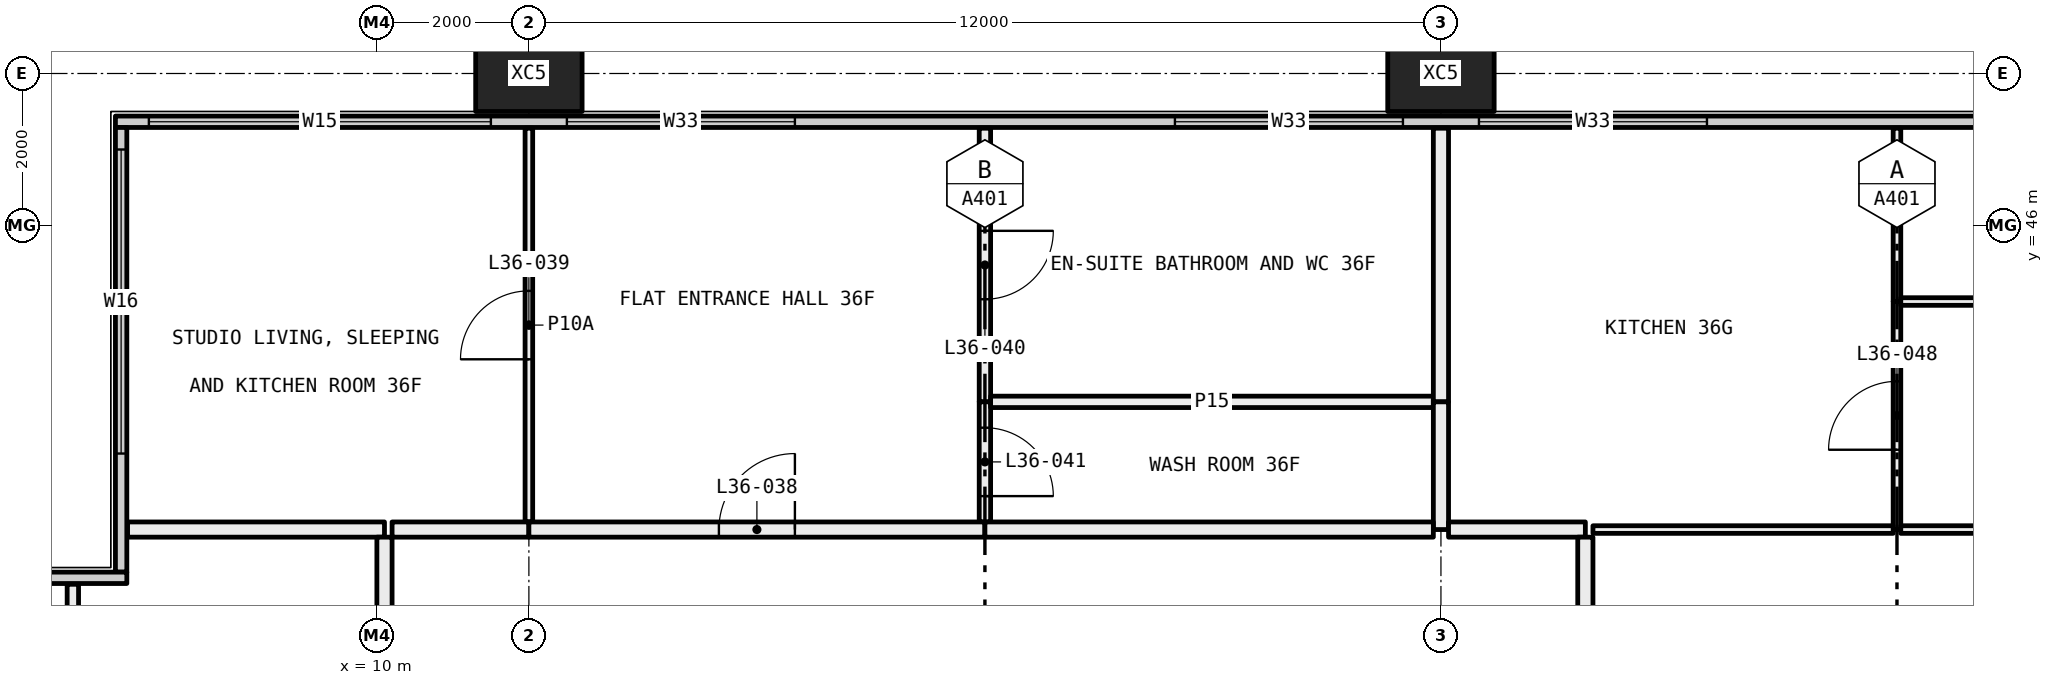
"""IFC4 building model, lengths in metres.
Left out: names, types, materials, properties, quantities, classifications, styles, units other than length and angle.
Written with IfcOpenShell. Run it as: python <this file> out.ifc"""

import sys

from ifc_helpers import new_model, si_unit, direction, frame, frame_2d, origin, origin_2d, place, context, subcontext, project, spatial, rectangle, hollow_rectangle, extrude, element, fill, save


model = new_model("IFC4")
c1 = context("Model", 3, precision=1e-05, world=origin(), true_north=direction((0.0, 1.0)))
c2 = subcontext(c1, "Body", "Model", "MODEL_VIEW")
j1 = project(units=[si_unit("LENGTHUNIT", "METRE"), si_unit("PLANEANGLEUNIT", "RADIAN")], contexts=[c1])
p1 = place(None, origin())
s1 = spatial("IfcSite", under=j1, at=p1, CompositionType="ELEMENT")
p2 = place(p1, origin())
s2 = spatial("IfcBuilding", under=s1, at=p2, CompositionType="ELEMENT")
p3 = place(p2, frame((0.0, 0.0, 138.0)))
s3 = spatial("IfcBuildingStorey", under=s2, at=p3, CompositionType="ELEMENT", Elevation=138.0)
for number, where, z_axis, x_axis in (
    (1, (12.0, 48.0, -0.4), (0.0, 0.0, 1.0), (1.0, 0.0, 0.0)),
    (2, (24.0, 48.0, -0.4), (0.0, 0.0, 1.0), (1.0, 0.0, 0.0)),
):
    element("IfcColumn", number, at=place(p3, frame(where, z_axis=z_axis, x_axis=x_axis)), inside=s3, PredefinedType="COLUMN", context=c2, shape_type="SweptSolid", body=[
        extrude(hollow_rectangle(XDim=1.4, YDim=1.0, WallThickness=0.055, at=origin_2d()), origin(), (0.0, 0.0, 1.0), 3.45),
    ])
p4 = place(p3, frame((6.56, 47.365, 0.0), z_axis=(0.0, 0.0, 1.0), x_axis=(1.0, 0.0, 0.0)))
e3 = element("IfcWall", 3, at=p4, inside=s3, PredefinedType="ELEMENTEDWALL", context=c2, shape_type="SweptSolid", body=[
    extrude(rectangle(XDim=58.88, YDim=0.15, at=frame_2d((29.44, 0.0))), origin(), (0.0, 0.0, 1.0), 3.05),
])
p5 = place(p4, frame((0.44, 0.0, 0.45)))
e4 = element("IfcOpeningElement", 4, at=p5, cuts=e3, PredefinedType="OPENING", context=c2, shape_type="SweptSolid", body=[
    extrude(rectangle(XDim=4.5, YDim=2.55, at=frame_2d((2.25, 1.275))), frame((0.0, 0.085, 0.0), z_axis=(0.0, -1.0, 0.0), x_axis=(1.0, 0.0, 0.0)), (0.0, 0.0, 1.0), 0.17),
])
p6 = place(p4, frame((5.94, 0.0, 0.45)))
e5 = element("IfcOpeningElement", 5, at=p6, cuts=e3, PredefinedType="OPENING", context=c2, shape_type="SweptSolid", body=[
    extrude(rectangle(XDim=3.0, YDim=2.55, at=frame_2d((1.5, 1.275))), frame((0.0, 0.085, 0.0), z_axis=(0.0, -1.0, 0.0), x_axis=(1.0, 0.0, 0.0)), (0.0, 0.0, 1.0), 0.17),
])
p7 = place(p4, frame((13.94, 0.0, 0.45)))
e6 = element("IfcOpeningElement", 6, at=p7, cuts=e3, PredefinedType="OPENING", context=c2, shape_type="SweptSolid", body=[
    extrude(rectangle(XDim=3.0, YDim=2.55, at=frame_2d((1.5, 1.275))), frame((0.0, 0.085, 0.0), z_axis=(0.0, -1.0, 0.0), x_axis=(1.0, 0.0, 0.0)), (0.0, 0.0, 1.0), 0.17),
])
p8 = place(p4, frame((17.94, 0.0, 0.45)))
e7 = element("IfcOpeningElement", 7, at=p8, cuts=e3, PredefinedType="OPENING", context=c2, shape_type="SweptSolid", body=[
    extrude(rectangle(XDim=3.0, YDim=2.55, at=frame_2d((1.5, 1.275))), frame((0.0, 0.085, 0.0), z_axis=(0.0, -1.0, 0.0), x_axis=(1.0, 0.0, 0.0)), (0.0, 0.0, 1.0), 0.17),
])
p9 = place(p4, frame((26.94, 0.0, 0.45)))
e8 = element("IfcOpeningElement", 8, at=p9, cuts=e3, PredefinedType="OPENING", context=c2, shape_type="SweptSolid", body=[
    extrude(rectangle(XDim=2.0, YDim=2.55, at=frame_2d((1.0, 1.275))), frame((0.0, 0.085, 0.0), z_axis=(0.0, -1.0, 0.0), x_axis=(1.0, 0.0, 0.0)), (0.0, 0.0, 1.0), 0.17),
])
p10 = place(p4, frame((29.94, 0.0, 0.45)))
e9 = element("IfcOpeningElement", 9, at=p10, cuts=e3, PredefinedType="OPENING", context=c2, shape_type="SweptSolid", body=[
    extrude(rectangle(XDim=3.0, YDim=2.55, at=frame_2d((1.5, 1.275))), frame((0.0, 0.085, 0.0), z_axis=(0.0, -1.0, 0.0), x_axis=(1.0, 0.0, 0.0)), (0.0, 0.0, 1.0), 0.17),
])
p11 = place(p4, frame((37.94, 0.0, 0.45)))
e10 = element("IfcOpeningElement", 10, at=p11, cuts=e3, PredefinedType="OPENING", context=c2, shape_type="SweptSolid", body=[
    extrude(rectangle(XDim=3.0, YDim=2.55, at=frame_2d((1.5, 1.275))), frame((0.0, 0.085, 0.0), z_axis=(0.0, -1.0, 0.0), x_axis=(1.0, 0.0, 0.0)), (0.0, 0.0, 1.0), 0.17),
])
p12 = place(p4, frame((41.94, 0.0, 0.45)))
e11 = element("IfcOpeningElement", 11, at=p12, cuts=e3, PredefinedType="OPENING", context=c2, shape_type="SweptSolid", body=[
    extrude(rectangle(XDim=3.0, YDim=2.55, at=frame_2d((1.5, 1.275))), frame((0.0, 0.085, 0.0), z_axis=(0.0, -1.0, 0.0), x_axis=(1.0, 0.0, 0.0)), (0.0, 0.0, 1.0), 0.17),
])
p13 = place(p4, frame((50.94, 0.0, 0.45)))
e12 = element("IfcOpeningElement", 12, at=p13, cuts=e3, PredefinedType="OPENING", context=c2, shape_type="SweptSolid", body=[
    extrude(rectangle(XDim=2.0, YDim=2.55, at=frame_2d((1.0, 1.275))), frame((0.0, 0.085, 0.0), z_axis=(0.0, -1.0, 0.0), x_axis=(1.0, 0.0, 0.0)), (0.0, 0.0, 1.0), 0.17),
])
p14 = place(p4, frame((53.94, 0.0, 0.45)))
e13 = element("IfcOpeningElement", 13, at=p14, cuts=e3, PredefinedType="OPENING", context=c2, shape_type="SweptSolid", body=[
    extrude(rectangle(XDim=4.5, YDim=2.55, at=frame_2d((2.25, 1.275))), frame((0.0, 0.085, 0.0), z_axis=(0.0, -1.0, 0.0), x_axis=(1.0, 0.0, 0.0)), (0.0, 0.0, 1.0), 0.17),
])
p15 = place(p3, frame((6.635, 41.44, 0.0), z_axis=(0.0, 0.0, 1.0), x_axis=(0.0, 1.0, 0.0)))
e14 = element("IfcWall", 14, at=p15, inside=s3, PredefinedType="ELEMENTEDWALL", context=c2, shape_type="SweptSolid", body=[
    extrude(rectangle(XDim=5.85, YDim=0.15, at=frame_2d((2.925, 0.0))), origin(), (0.0, 0.0, 1.0), 3.05),
])
p16 = place(p15, frame((1.56, 0.0, 0.45)))
e15 = element("IfcOpeningElement", 15, at=p16, cuts=e14, PredefinedType="OPENING", context=c2, shape_type="SweptSolid", body=[
    extrude(rectangle(XDim=4.0, YDim=2.55, at=frame_2d((2.0, 1.275))), frame((0.0, 0.085, 0.0), z_axis=(0.0, -1.0, 0.0), x_axis=(1.0, 0.0, 0.0)), (0.0, 0.0, 1.0), 0.17),
])
p17 = place(p3, frame((0.56, 41.365, 0.0), z_axis=(0.0, 0.0, 1.0), x_axis=(1.0, 0.0, 0.0)))
e16 = element("IfcWall", 16, at=p17, inside=s3, PredefinedType="ELEMENTEDWALL", context=c2, shape_type="SweptSolid", body=[
    extrude(rectangle(XDim=6.15, YDim=0.15, at=frame_2d((3.075, 0.0))), origin(), (0.0, 0.0, 1.0), 3.05),
])
p18 = place(p17, frame((0.44, 0.0, 0.45)))
e17 = element("IfcOpeningElement", 17, at=p18, cuts=e16, PredefinedType="OPENING", context=c2, shape_type="SweptSolid", body=[
    extrude(rectangle(XDim=4.0, YDim=2.55, at=frame_2d((2.0, 1.275))), frame((0.0, 0.085, 0.0), z_axis=(0.0, -1.0, 0.0), x_axis=(1.0, 0.0, 0.0)), (0.0, 0.0, 1.0), 0.17),
])
p19 = place(p3, frame((6.0, 37.5, 0.0), z_axis=(0.0, 0.0, 1.0), x_axis=(0.0, 1.0, 0.0)))
e18 = element("IfcWall", 18, at=p19, inside=s3, PredefinedType="PARTITIONING", context=c2, shape_type="SweptSolid", body=[
    extrude(rectangle(XDim=3.78, YDim=0.15, at=frame_2d((1.89, 0.0))), origin(), (0.0, 0.0, 1.0), 3.05),
])
p20 = place(p3, frame((10.1, 42.0, 0.0), z_axis=(0.0, 0.0, 1.0), x_axis=(-1.0, 0.0, 0.0)))
e19 = element("IfcWall", 19, at=p20, inside=s3, PredefinedType="PARTITIONING", context=c2, shape_type="SweptSolid", body=[
    extrude(rectangle(XDim=3.38, YDim=0.2, at=frame_2d((1.69, 0.0))), origin(), (0.0, 0.0, 1.0), 3.05),
])
p21 = place(p3, frame((10.1, 37.5, 0.0), z_axis=(0.0, 0.0, 1.0), x_axis=(0.0, 1.0, 0.0)))
e20 = element("IfcWall", 20, at=p21, inside=s3, PredefinedType="PARTITIONING", context=c2, shape_type="SweptSolid", body=[
    extrude(rectangle(XDim=4.4, YDim=0.2, at=frame_2d((2.2, 0.0))), origin(), (0.0, 0.0, 1.0), 3.05),
])
p22 = place(p3, frame((12.0, 42.1, 0.0), z_axis=(0.0, 0.0, 1.0), x_axis=(0.0, 1.0, 0.0)))
e21 = element("IfcWall", 21, at=p22, inside=s3, PredefinedType="PARTITIONING", context=c2, shape_type="SweptSolid", body=[
    extrude(rectangle(XDim=5.18, YDim=0.1, at=frame_2d((2.59, 0.0))), origin(), (0.0, 0.0, 1.0), 3.05),
])
p23 = place(p22, frame((2.14, 0.0, 0.0)))
e22 = element("IfcOpeningElement", 22, at=p23, cuts=e21, PredefinedType="OPENING", context=c2, shape_type="SweptSolid", body=[
    extrude(rectangle(XDim=0.9, YDim=2.1, at=frame_2d((0.45, 1.05))), frame((0.0, 0.06, 0.0), z_axis=(0.0, -1.0, 0.0), x_axis=(1.0, 0.0, 0.0)), (0.0, 0.0, 1.0), 0.12),
])
p24 = place(p3, frame((10.2, 42.0, 0.0), z_axis=(0.0, 0.0, 1.0), x_axis=(1.0, 0.0, 0.0)))
e23 = element("IfcWall", 23, at=p24, inside=s3, PredefinedType="PARTITIONING", context=c2, shape_type="SweptSolid", body=[
    extrude(rectangle(XDim=1.8, YDim=0.2, at=frame_2d((0.9, 0.0))), origin(), (0.0, 0.0, 1.0), 3.05),
])
p25 = place(p3, frame((18.0, 43.68, 0.0), z_axis=(0.0, 0.0, 1.0), x_axis=(0.0, 1.0, 0.0)))
e24 = element("IfcWall", 24, at=p25, inside=s3, PredefinedType="PARTITIONING", context=c2, shape_type="SweptSolid", body=[
    extrude(rectangle(XDim=3.6, YDim=0.15, at=frame_2d((1.8, 0.0))), origin(), (0.0, 0.0, 1.0), 3.05),
])
p26 = place(p25, frame((1.35, 0.0, 0.0)))
e25 = element("IfcOpeningElement", 25, at=p26, cuts=e24, PredefinedType="OPENING", context=c2, shape_type="SweptSolid", body=[
    extrude(rectangle(XDim=0.9, YDim=2.1, at=frame_2d((0.45, 1.05))), frame((0.0, 0.085, 0.0), z_axis=(0.0, -1.0, 0.0), x_axis=(1.0, 0.0, 0.0)), (0.0, 0.0, 1.0), 0.17),
])
p27 = place(p3, frame((18.0, 42.1, 0.0), z_axis=(0.0, 0.0, 1.0), x_axis=(0.0, 1.0, 0.0)))
e26 = element("IfcWall", 26, at=p27, inside=s3, PredefinedType="PARTITIONING", context=c2, shape_type="SweptSolid", body=[
    extrude(rectangle(XDim=1.58, YDim=0.15, at=frame_2d((0.79, 0.0))), origin(), (0.0, 0.0, 1.0), 3.05),
])
p28 = place(p27, frame((0.34, 0.0, 0.0)))
e27 = element("IfcOpeningElement", 27, at=p28, cuts=e26, PredefinedType="OPENING", context=c2, shape_type="SweptSolid", body=[
    extrude(rectangle(XDim=0.9, YDim=2.1, at=frame_2d((0.45, 1.05))), frame((0.0, 0.085, 0.0), z_axis=(0.0, -1.0, 0.0), x_axis=(1.0, 0.0, 0.0)), (0.0, 0.0, 1.0), 0.17),
])
p29 = place(p3, frame((12.0, 42.0, 0.0), z_axis=(0.0, 0.0, 1.0), x_axis=(1.0, 0.0, 0.0)))
e28 = element("IfcWall", 28, at=p29, inside=s3, PredefinedType="PARTITIONING", context=c2, shape_type="SweptSolid", body=[
    extrude(rectangle(XDim=6.0, YDim=0.2, at=frame_2d((3.0, 0.0))), origin(), (0.0, 0.0, 1.0), 3.05),
])
p30 = place(p29, frame((2.5, 0.0, 0.0)))
e29 = element("IfcOpeningElement", 29, at=p30, cuts=e28, PredefinedType="OPENING", context=c2, shape_type="SweptSolid", body=[
    extrude(rectangle(XDim=1.0, YDim=2.1, at=frame_2d((0.5, 1.05))), frame((0.0, 0.11, 0.0), z_axis=(0.0, -1.0, 0.0), x_axis=(1.0, 0.0, 0.0)), (0.0, 0.0, 1.0), 0.22),
])
p31 = place(p3, frame((18.075, 43.68, 0.0), z_axis=(0.0, 0.0, 1.0), x_axis=(1.0, 0.0, 0.0)))
e30 = element("IfcWall", 30, at=p31, inside=s3, PredefinedType="PARTITIONING", context=c2, shape_type="SweptSolid", body=[
    extrude(rectangle(XDim=5.825, YDim=0.15, at=frame_2d((2.913, 0.0))), origin(), (0.0, 0.0, 1.0), 3.05),
])
p32 = place(p3, frame((24.0, 43.68, 0.0), z_axis=(0.0, 0.0, 1.0), x_axis=(0.0, 1.0, 0.0)))
e31 = element("IfcWall", 31, at=p32, inside=s3, PredefinedType="PARTITIONING", context=c2, shape_type="SweptSolid", body=[
    extrude(rectangle(XDim=3.6, YDim=0.2, at=frame_2d((1.8, 0.0))), origin(), (0.0, 0.0, 1.0), 3.05),
])
p33 = place(p3, frame((24.0, 42.0, 0.0), z_axis=(0.0, 0.0, 1.0), x_axis=(0.0, 1.0, 0.0)))
e32 = element("IfcWall", 32, at=p33, inside=s3, PredefinedType="PARTITIONING", context=c2, shape_type="SweptSolid", body=[
    extrude(rectangle(XDim=1.68, YDim=0.2, at=frame_2d((0.84, 0.0))), origin(), (0.0, 0.0, 1.0), 3.05),
])
p34 = place(p3, frame((18.0, 42.0, 0.0), z_axis=(0.0, 0.0, 1.0), x_axis=(1.0, 0.0, 0.0)))
e33 = element("IfcWall", 33, at=p34, inside=s3, PredefinedType="PARTITIONING", context=c2, shape_type="SweptSolid", body=[
    extrude(rectangle(XDim=5.9, YDim=0.2, at=frame_2d((2.95, 0.0))), origin(), (0.0, 0.0, 1.0), 3.05),
])
p35 = place(p3, frame((30.0, 42.0, 0.0), z_axis=(0.0, 0.0, 1.0), x_axis=(0.0, 1.0, 0.0)))
e34 = element("IfcWall", 34, at=p35, inside=s3, PredefinedType="PARTITIONING", context=c2, shape_type="SweptSolid", body=[
    extrude(rectangle(XDim=3.0, YDim=0.1, at=frame_2d((1.5, 0.0))), origin(), (0.0, 0.0, 1.0), 3.05),
])
p36 = place(p35, frame((1.05, 0.0, 0.0)))
e35 = element("IfcOpeningElement", 35, at=p36, cuts=e34, PredefinedType="OPENING", context=c2, shape_type="SweptSolid", body=[
    extrude(rectangle(XDim=0.9, YDim=2.1, at=frame_2d((0.45, 1.05))), frame((0.0, 0.06, 0.0), z_axis=(0.0, -1.0, 0.0), x_axis=(1.0, 0.0, 0.0)), (0.0, 0.0, 1.0), 0.12),
])
p37 = place(p3, frame((30.0, 45.0, 0.0), z_axis=(0.0, 0.0, 1.0), x_axis=(0.0, 1.0, 0.0)))
e36 = element("IfcWall", 36, at=p37, inside=s3, PredefinedType="PARTITIONING", context=c2, shape_type="SweptSolid", body=[
    extrude(rectangle(XDim=2.28, YDim=0.1, at=frame_2d((1.14, 0.0))), origin(), (0.0, 0.0, 1.0), 3.05),
])
p38 = place(p3, frame((26.0, 42.0, 0.0), z_axis=(0.0, 0.0, 1.0), x_axis=(1.0, 0.0, 0.0)))
e37 = element("IfcWall", 37, at=p38, inside=s3, PredefinedType="PARTITIONING", context=c2, shape_type="SweptSolid", body=[
    extrude(rectangle(XDim=3.95, YDim=0.1, at=frame_2d((1.975, 0.0))), origin(), (0.0, 0.0, 1.0), 3.05),
])
p39 = place(p3, frame((24.1, 42.0, 0.0), z_axis=(0.0, 0.0, 1.0), x_axis=(1.0, 0.0, 0.0)))
e38 = element("IfcWall", 38, at=p39, inside=s3, PredefinedType="PARTITIONING", context=c2, shape_type="SweptSolid", body=[
    extrude(rectangle(XDim=1.8, YDim=0.2, at=frame_2d((0.9, 0.0))), origin(), (0.0, 0.0, 1.0), 3.05),
])
p40 = place(p3, frame((35.9, 45.0, 0.0), z_axis=(0.0, 0.0, 1.0), x_axis=(-1.0, 0.0, 0.0)))
e39 = element("IfcWall", 39, at=p40, inside=s3, PredefinedType="PARTITIONING", context=c2, shape_type="SweptSolid", body=[
    extrude(rectangle(XDim=5.85, YDim=0.1, at=frame_2d((2.925, 0.0))), origin(), (0.0, 0.0, 1.0), 3.05),
])
p41 = place(p3, frame((30.05, 42.0, 0.0), z_axis=(0.0, 0.0, 1.0), x_axis=(1.0, 0.0, 0.0)))
e40 = element("IfcWall", 40, at=p41, inside=s3, PredefinedType="PARTITIONING", context=c2, shape_type="SweptSolid", body=[
    extrude(rectangle(XDim=5.875, YDim=0.1, at=frame_2d((2.938, 0.0))), origin(), (0.0, 0.0, 1.0), 2.45),
])
p42 = place(p41, frame((2.488, 0.0, 0.0)))
e41 = element("IfcOpeningElement", 41, at=p42, cuts=e40, PredefinedType="OPENING", context=c2, shape_type="SweptSolid", body=[
    extrude(rectangle(XDim=0.9, YDim=2.1, at=frame_2d((0.45, 1.05))), frame((0.0, 0.06, 0.0), z_axis=(0.0, -1.0, 0.0), x_axis=(1.0, 0.0, 0.0)), (0.0, 0.0, 1.0), 0.12),
])
p43 = place(p3, frame((25.9, 41.9, 0.0), z_axis=(0.0, 0.0, 1.0), x_axis=(0.0, -1.0, 0.0)))
e42 = element("IfcWall", 42, at=p43, inside=s3, PredefinedType="PARTITIONING", context=c2, shape_type="SweptSolid", body=[
    extrude(rectangle(XDim=6.2, YDim=0.2, at=frame_2d((3.1, 0.0))), origin(), (0.0, 0.0, 1.0), 2.45),
])
p44 = place(p5, origin())
e43 = element("IfcWindow", 43, at=p44, inside=s3, PartitioningType="SINGLE_PANEL", PredefinedType="WINDOW", context=c2, shape_type="SweptSolid", body=[
    extrude(rectangle(XDim=4.5, YDim=2.55, at=frame_2d((2.25, 1.275))), frame((0.0, 0.03, 0.0), z_axis=(0.0, -1.0, 0.0), x_axis=(1.0, 0.0, 0.0)), (0.0, 0.0, 1.0), 0.06),
])
fill(e4, e43)
p45 = place(p6, origin())
e44 = element("IfcWindow", 44, at=p45, inside=s3, PartitioningType="SINGLE_PANEL", PredefinedType="WINDOW", context=c2, shape_type="SweptSolid", body=[
    extrude(rectangle(XDim=3.0, YDim=2.55, at=frame_2d((1.5, 1.275))), frame((0.0, 0.03, 0.0), z_axis=(0.0, -1.0, 0.0), x_axis=(1.0, 0.0, 0.0)), (0.0, 0.0, 1.0), 0.06),
])
fill(e5, e44)
p46 = place(p7, origin())
e45 = element("IfcWindow", 45, at=p46, inside=s3, PartitioningType="SINGLE_PANEL", PredefinedType="WINDOW", context=c2, shape_type="SweptSolid", body=[
    extrude(rectangle(XDim=3.0, YDim=2.55, at=frame_2d((1.5, 1.275))), frame((0.0, 0.03, 0.0), z_axis=(0.0, -1.0, 0.0), x_axis=(1.0, 0.0, 0.0)), (0.0, 0.0, 1.0), 0.06),
])
fill(e6, e45)
p47 = place(p8, origin())
e46 = element("IfcWindow", 46, at=p47, inside=s3, PartitioningType="SINGLE_PANEL", PredefinedType="WINDOW", context=c2, shape_type="SweptSolid", body=[
    extrude(rectangle(XDim=3.0, YDim=2.55, at=frame_2d((1.5, 1.275))), frame((0.0, 0.03, 0.0), z_axis=(0.0, -1.0, 0.0), x_axis=(1.0, 0.0, 0.0)), (0.0, 0.0, 1.0), 0.06),
])
fill(e7, e46)
p48 = place(p16, origin())
e47 = element("IfcWindow", 47, at=p48, inside=s3, PartitioningType="SINGLE_PANEL", PredefinedType="WINDOW", context=c2, shape_type="SweptSolid", body=[
    extrude(rectangle(XDim=4.0, YDim=2.55, at=frame_2d((2.0, 1.275))), frame((0.0, 0.03, 0.0), z_axis=(0.0, -1.0, 0.0), x_axis=(1.0, 0.0, 0.0)), (0.0, 0.0, 1.0), 0.06),
])
fill(e15, e47)
p49 = place(p30, origin())
e48 = element("IfcDoor", 48, at=p49, inside=s3, OperationType="SINGLE_SWING_LEFT", PredefinedType="DOOR", context=c2, shape_type="SweptSolid", body=[
    extrude(rectangle(XDim=1.0, YDim=2.1, at=frame_2d((0.5, 1.05))), frame((0.0, 0.025, 0.0), z_axis=(0.0, -1.0, 0.0), x_axis=(1.0, 0.0, 0.0)), (0.0, 0.0, 1.0), 0.05),
])
fill(e29, e48)
p50 = place(p23, origin())
e49 = element("IfcDoor", 49, at=p50, inside=s3, OperationType="SINGLE_SWING_RIGHT", PredefinedType="DOOR", context=c2, shape_type="SweptSolid", body=[
    extrude(rectangle(XDim=0.9, YDim=2.1, at=frame_2d((0.45, 1.05))), frame((0.0, 0.025, 0.0), z_axis=(0.0, -1.0, 0.0), x_axis=(1.0, 0.0, 0.0)), (0.0, 0.0, 1.0), 0.05),
])
fill(e22, e49)
p51 = place(p26, frame((0.9, 0.0, 0.0), x_axis=(-1.0, 0.0, 0.0)))
e50 = element("IfcDoor", 50, at=p51, inside=s3, OperationType="SINGLE_SWING_RIGHT", PredefinedType="DOOR", context=c2, shape_type="SweptSolid", body=[
    extrude(rectangle(XDim=0.9, YDim=2.1, at=frame_2d((0.45, 1.05))), frame((0.0, 0.025, 0.0), z_axis=(0.0, -1.0, 0.0), x_axis=(1.0, 0.0, 0.0)), (0.0, 0.0, 1.0), 0.05),
])
fill(e25, e50)
p52 = place(p28, frame((0.9, 0.0, 0.0), x_axis=(-1.0, 0.0, 0.0)))
e51 = element("IfcDoor", 51, at=p52, inside=s3, OperationType="SINGLE_SWING_LEFT", PredefinedType="DOOR", context=c2, shape_type="SweptSolid", body=[
    extrude(rectangle(XDim=0.9, YDim=2.1, at=frame_2d((0.45, 1.05))), frame((0.0, 0.025, 0.0), z_axis=(0.0, -1.0, 0.0), x_axis=(1.0, 0.0, 0.0)), (0.0, 0.0, 1.0), 0.05),
])
fill(e27, e51)
p53 = place(p36, origin())
e52 = element("IfcDoor", 52, at=p53, inside=s3, OperationType="SINGLE_SWING_RIGHT", PredefinedType="DOOR", context=c2, shape_type="SweptSolid", body=[
    extrude(rectangle(XDim=0.9, YDim=2.1, at=frame_2d((0.45, 1.05))), frame((0.0, 0.025, 0.0), z_axis=(0.0, -1.0, 0.0), x_axis=(1.0, 0.0, 0.0)), (0.0, 0.0, 1.0), 0.05),
])
fill(e35, e52)
save(model, sys.argv[1])
